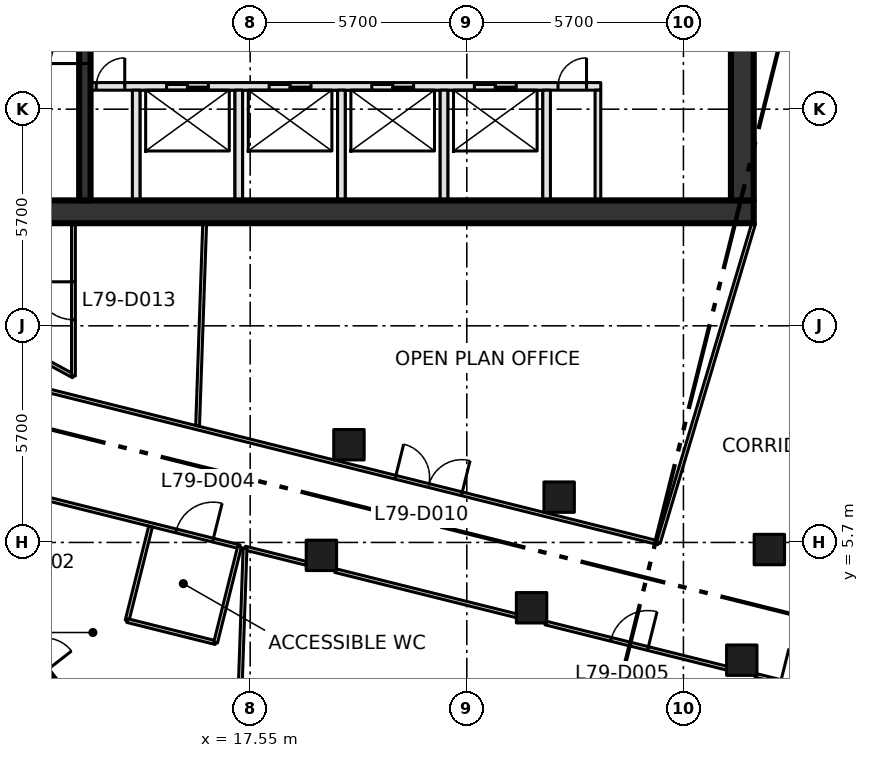
"""IFC4 building model, lengths in metres.
Left out: names, types, materials, properties, quantities, classifications, styles, units other than length and angle.
Written with IfcOpenShell. Run it as: python <this file> out.ifc"""

import sys

from ifc_helpers import new_model, si_unit, direction, frame, frame_2d, origin, origin_2d, place, context, subcontext, project, spatial, rectangle, extrude, element, fill, save


model = new_model("IFC4")
c1 = context("Model", 3, precision=1e-05, world=origin(), true_north=direction((0.0, 1.0)))
c2 = subcontext(c1, "Body", "Model", "MODEL_VIEW")
j1 = project(units=[si_unit("LENGTHUNIT", "METRE"), si_unit("PLANEANGLEUNIT", "RADIAN")], contexts=[c1])
p1 = place(None, origin())
s1 = spatial("IfcSite", under=j1, at=p1, CompositionType="ELEMENT")
p2 = place(p1, origin())
s2 = spatial("IfcBuilding", under=s1, at=p2, CompositionType="ELEMENT")
p3 = place(p2, frame((0.0, 0.0, 344.4)))
s3 = spatial("IfcBuildingStorey", under=s2, at=p3, CompositionType="ELEMENT", Elevation=344.4)
for number, where, z_axis, x_axis in (
    (1, (19.424, 5.36, 0.0), (0.0, 0.0, 1.0), (1.0, 0.0, 0.0)),
    (2, (24.954, 3.981, 0.0), (0.0, 0.0, 1.0), (1.0, 0.0, 0.0)),
    (3, (30.485, 2.602, 0.0), (0.0, 0.0, 1.0), (1.0, 0.0, 0.0)),
    (4, (20.149, 8.271, 0.0), (0.0, 0.0, 1.0), (1.0, 0.0, 0.0)),
    (5, (25.68, 6.892, 0.0), (0.0, 0.0, 1.0), (1.0, 0.0, 0.0)),
    (6, (31.211, 5.513, 0.0), (0.0, 0.0, 1.0), (1.0, 0.0, 0.0)),
):
    element("IfcColumn", number, at=place(p3, frame(where, z_axis=z_axis, x_axis=x_axis)), inside=s3, PredefinedType="COLUMN", context=c2, shape_type="SweptSolid", body=[
        extrude(rectangle(XDim=0.8, YDim=0.8, at=origin_2d()), origin(), (0.0, 0.0, 1.0), 4.2),
    ])
p4 = place(p3, frame((8.0, 14.4, -0.3), z_axis=(0.0, 0.0, 1.0), x_axis=(1.0, 0.0, 0.0)))
e7 = element("IfcWall", 7, at=p4, inside=s3, PredefinedType="SHEAR", context=c2, shape_type="SweptSolid", body=[
    extrude(rectangle(XDim=22.8, YDim=0.6, at=frame_2d((11.4, 0.0))), origin(), (0.0, 0.0, 1.0), 4.05),
])
p5 = place(p4, frame((2.3, 0.0, 0.3)))
e8 = element("IfcOpeningElement", 8, at=p5, cuts=e7, PredefinedType="OPENING", context=c2, shape_type="SweptSolid", body=[
    extrude(rectangle(XDim=1.8, YDim=2.1, at=frame_2d((0.9, 1.05))), frame((0.0, 0.31, 0.0), z_axis=(0.0, -1.0, 0.0), x_axis=(1.0, 0.0, 0.0)), (0.0, 0.0, 1.0), 0.62),
])
p6 = place(p3, frame((30.5, 14.7, -0.3), z_axis=(0.0, 0.0, 1.0), x_axis=(0.0, 1.0, 0.0)))
e9 = element("IfcWall", 9, at=p6, inside=s3, PredefinedType="SHEAR", context=c2, shape_type="SweptSolid", body=[
    extrude(rectangle(XDim=21.0, YDim=0.6, at=frame_2d((10.5, 0.0))), origin(), (0.0, 0.0, 1.0), 4.05),
])
p7 = place(p3, frame((13.35, 17.7, 0.0), z_axis=(0.0, 0.0, 1.0), x_axis=(1.0, 0.0, 0.0)))
e10 = element("IfcWall", 10, at=p7, inside=s3, PredefinedType="SOLIDWALL", context=c2, shape_type="SweptSolid", body=[
    extrude(rectangle(XDim=13.425, YDim=0.2, at=frame_2d((6.712, 0.0))), origin(), (0.0, 0.0, 1.0), 3.75),
])
p8 = place(p7, frame((2.0, 0.0, 0.0)))
e11 = element("IfcOpeningElement", 11, at=p8, cuts=e10, PredefinedType="OPENING", context=c2, shape_type="SweptSolid", body=[
    extrude(rectangle(XDim=1.1, YDim=2.1, at=frame_2d((0.55, 1.05))), frame((0.0, 0.11, 0.0), z_axis=(0.0, -1.0, 0.0), x_axis=(1.0, 0.0, 0.0)), (0.0, 0.0, 1.0), 0.22),
])
p9 = place(p7, frame((4.7, 0.0, 0.0)))
e12 = element("IfcOpeningElement", 12, at=p9, cuts=e10, PredefinedType="OPENING", context=c2, shape_type="SweptSolid", body=[
    extrude(rectangle(XDim=1.1, YDim=2.1, at=frame_2d((0.55, 1.05))), frame((0.0, 0.11, 0.0), z_axis=(0.0, -1.0, 0.0), x_axis=(1.0, 0.0, 0.0)), (0.0, 0.0, 1.0), 0.22),
])
p10 = place(p7, frame((7.4, 0.0, 0.0)))
e13 = element("IfcOpeningElement", 13, at=p10, cuts=e10, PredefinedType="OPENING", context=c2, shape_type="SweptSolid", body=[
    extrude(rectangle(XDim=1.1, YDim=2.1, at=frame_2d((0.55, 1.05))), frame((0.0, 0.11, 0.0), z_axis=(0.0, -1.0, 0.0), x_axis=(1.0, 0.0, 0.0)), (0.0, 0.0, 1.0), 0.22),
])
p11 = place(p7, frame((10.1, 0.0, 0.0)))
e14 = element("IfcOpeningElement", 14, at=p11, cuts=e10, PredefinedType="OPENING", context=c2, shape_type="SweptSolid", body=[
    extrude(rectangle(XDim=1.1, YDim=2.1, at=frame_2d((0.55, 1.05))), frame((0.0, 0.11, 0.0), z_axis=(0.0, -1.0, 0.0), x_axis=(1.0, 0.0, 0.0)), (0.0, 0.0, 1.0), 0.22),
])
p12 = place(p7, frame((0.15, 0.0, 0.0)))
e15 = element("IfcOpeningElement", 15, at=p12, cuts=e10, PredefinedType="OPENING", context=c2, shape_type="SweptSolid", body=[
    extrude(rectangle(XDim=0.75, YDim=2.1, at=frame_2d((0.375, 1.05))), frame((0.0, 0.11, 0.0), z_axis=(0.0, -1.0, 0.0), x_axis=(1.0, 0.0, 0.0)), (0.0, 0.0, 1.0), 0.22),
])
p13 = place(p7, frame((12.3, 0.0, 0.0)))
e16 = element("IfcOpeningElement", 16, at=p13, cuts=e10, PredefinedType="OPENING", context=c2, shape_type="SweptSolid", body=[
    extrude(rectangle(XDim=0.75, YDim=2.1, at=frame_2d((0.375, 1.05))), frame((0.0, 0.11, 0.0), z_axis=(0.0, -1.0, 0.0), x_axis=(1.0, 0.0, 0.0)), (0.0, 0.0, 1.0), 0.22),
])
p14 = place(p3, frame((13.2, 14.7, 0.0), z_axis=(0.0, 0.0, 1.0), x_axis=(0.0, 1.0, 0.0)))
e17 = element("IfcWall", 17, at=p14, inside=s3, PredefinedType="SHEAR", context=c2, shape_type="SweptSolid", body=[
    extrude(rectangle(XDim=21.0, YDim=0.3, at=frame_2d((10.5, 0.0))), origin(), (0.0, 0.0, 1.0), 3.75),
])
p15 = place(p14, frame((3.6, 0.0, 0.0)))
e18 = element("IfcOpeningElement", 18, at=p15, cuts=e17, PredefinedType="OPENING", context=c2, shape_type="SweptSolid", body=[
    extrude(rectangle(XDim=1.8, YDim=2.1, at=frame_2d((0.9, 1.05))), frame((0.0, 0.16, 0.0), z_axis=(0.0, -1.0, 0.0), x_axis=(1.0, 0.0, 0.0)), (0.0, 0.0, 1.0), 0.32),
])
p16 = place(p14, frame((11.7, 0.0, 0.0)))
e19 = element("IfcOpeningElement", 19, at=p16, cuts=e17, PredefinedType="OPENING", context=c2, shape_type="SweptSolid", body=[
    extrude(rectangle(XDim=1.2, YDim=2.1, at=frame_2d((0.6, 1.05))), frame((0.0, 0.16, 0.0), z_axis=(0.0, -1.0, 0.0), x_axis=(1.0, 0.0, 0.0)), (0.0, 0.0, 1.0), 0.32),
])
for number, where, z_axis, x_axis in (
    (20, (14.55, 14.7, 0.0), (0.0, 0.0, 1.0), (0.0, 1.0, 0.0)),
    (21, (17.25, 14.7, 0.0), (0.0, 0.0, 1.0), (0.0, 1.0, 0.0)),
    (22, (19.95, 14.7, 0.0), (0.0, 0.0, 1.0), (0.0, 1.0, 0.0)),
    (23, (22.65, 14.7, 0.0), (0.0, 0.0, 1.0), (0.0, 1.0, 0.0)),
    (24, (25.35, 14.7, 0.0), (0.0, 0.0, 1.0), (0.0, 1.0, 0.0)),
):
    element("IfcWall", number, at=place(p3, frame(where, z_axis=z_axis, x_axis=x_axis)), inside=s3, PredefinedType="SOLIDWALL", context=c2, shape_type="SweptSolid", body=[
        extrude(rectangle(XDim=2.9, YDim=0.2, at=frame_2d((1.45, 0.0))), origin(), (0.0, 0.0, 1.0), 3.75),
    ])
p17 = place(p3, frame((26.7, 14.7, 0.0), z_axis=(0.0, 0.0, 1.0), x_axis=(0.0, 1.0, 0.0)))
e25 = element("IfcWall", 25, at=p17, inside=s3, PredefinedType="PARTITIONING", context=c2, shape_type="SweptSolid", body=[
    extrude(rectangle(XDim=2.9, YDim=0.15, at=frame_2d((1.45, 0.0))), origin(), (0.0, 0.0, 1.0), 3.75),
])
p18 = place(p3, frame((10.224, 4.745, 0.0), z_axis=(0.0, 0.0, 1.0), x_axis=(0.615545644418, -0.788101236922, 0.0)))
e26 = element("IfcWall", 26, at=p18, inside=s3, PredefinedType="SOLIDWALL", context=c2, shape_type="SweptSolid", body=[
    extrude(rectangle(XDim=4.43, YDim=0.2, at=frame_2d((2.215, 0.0))), origin(), (0.0, 0.0, 1.0), 3.05),
])
p19 = place(p18, frame((1.315, 0.0, 0.0)))
e27 = element("IfcOpeningElement", 27, at=p19, cuts=e26, PredefinedType="OPENING", context=c2, shape_type="SweptSolid", body=[
    extrude(rectangle(XDim=1.8, YDim=2.9, at=frame_2d((0.9, 1.45))), frame((0.0, 0.11, 0.0), z_axis=(0.0, -1.0, 0.0), x_axis=(1.0, 0.0, 0.0)), (0.0, 0.0, 1.0), 0.22),
])
p20 = place(p3, frame((8.333, 7.815, 0.0), z_axis=(0.0, 0.0, 1.0), x_axis=(0.970301331289, -0.241899414012, 0.0)))
e28 = element("IfcWall", 28, at=p20, inside=s3, PredefinedType="PARTITIONING", context=c2, shape_type="SweptSolid", body=[
    extrude(rectangle(XDim=9.21, YDim=0.1, at=frame_2d((4.605, 0.0))), origin(), (0.0, 0.0, 1.0), 3.75),
])
p21 = place(p20, frame((7.49, 0.0, 0.0)))
e29 = element("IfcOpeningElement", 29, at=p21, cuts=e28, PredefinedType="OPENING", context=c2, shape_type="SweptSolid", body=[
    extrude(rectangle(XDim=1.0, YDim=2.1, at=frame_2d((0.5, 1.05))), frame((0.0, 0.06, 0.0), z_axis=(0.0, -1.0, 0.0), x_axis=(1.0, 0.0, 0.0)), (0.0, 0.0, 1.0), 0.12),
])
p22 = place(p3, frame((9.002, 10.499, 0.0), z_axis=(0.0, 0.0, 1.0), x_axis=(0.970298340477, -0.241911410372, 0.0)))
e30 = element("IfcWall", 30, at=p22, inside=s3, PredefinedType="PARTITIONING", context=c2, shape_type="SweptSolid", body=[
    extrude(rectangle(XDim=19.88, YDim=0.1, at=frame_2d((9.94, 0.0))), origin(), (0.0, 0.0, 1.0), 3.75),
])
p23 = place(p22, frame((12.749, 0.0, 0.0)))
e31 = element("IfcOpeningElement", 31, at=p23, cuts=e30, PredefinedType="OPENING", context=c2, shape_type="SweptSolid", body=[
    extrude(rectangle(XDim=1.8, YDim=2.1, at=frame_2d((0.9, 1.05))), frame((0.0, 0.06, 0.0), z_axis=(0.0, -1.0, 0.0), x_axis=(1.0, 0.0, 0.0)), (0.0, 0.0, 1.0), 0.12),
])
p24 = place(p3, frame((9.9, 11.7, 0.0), z_axis=(0.0, 0.0, 1.0), x_axis=(0.87965147249, -0.475618846291, 0.0)))
e32 = element("IfcWall", 32, at=p24, inside=s3, PredefinedType="PARTITIONING", context=c2, shape_type="SweptSolid", body=[
    extrude(rectangle(XDim=3.41, YDim=0.1, at=frame_2d((1.705, 0.0))), origin(), (0.0, 0.0, 1.0), 3.75),
])
p25 = place(p3, frame((12.9, 10.078, 0.0), z_axis=(0.0, 0.0, 1.0), x_axis=(0.0, 1.0, 0.0)))
e33 = element("IfcWall", 33, at=p25, inside=s3, PredefinedType="PARTITIONING", context=c2, shape_type="SweptSolid", body=[
    extrude(rectangle(XDim=4.022, YDim=0.1, at=frame_2d((2.011, 0.0))), origin(), (0.0, 0.0, 1.0), 3.75),
])
p26 = place(p25, frame((1.48, 0.0, 0.0)))
e34 = element("IfcOpeningElement", 34, at=p26, cuts=e33, PredefinedType="OPENING", context=c2, shape_type="SweptSolid", body=[
    extrude(rectangle(XDim=1.0, YDim=2.1, at=frame_2d((0.5, 1.05))), frame((0.0, 0.06, 0.0), z_axis=(0.0, -1.0, 0.0), x_axis=(1.0, 0.0, 0.0)), (0.0, 0.0, 1.0), 0.12),
])
p27 = place(p3, frame((17.415, 5.551, 0.0), z_axis=(0.0, 0.0, 1.0), x_axis=(0.970298198748, -0.241911978838, 0.0)))
e35 = element("IfcWall", 35, at=p27, inside=s3, PredefinedType="PARTITIONING", context=c2, shape_type="SweptSolid", body=[
    extrude(rectangle(XDim=1.658, YDim=0.1, at=frame_2d((0.829, 0.0))), origin(), (0.0, 0.0, 1.0), 3.75),
])
p28 = place(p3, frame((19.786, 4.96, 0.0), z_axis=(0.0, 0.0, 1.0), x_axis=(0.970288447449, -0.24195108751, 0.0)))
e36 = element("IfcWall", 36, at=p28, inside=s3, PredefinedType="PARTITIONING", context=c2, shape_type="SweptSolid", body=[
    extrude(rectangle(XDim=4.914, YDim=0.1, at=frame_2d((2.457, 0.0))), origin(), (0.0, 0.0, 1.0), 3.75),
])
p29 = place(p3, frame((25.318, 3.581, 0.0), z_axis=(0.0, 0.0, 1.0), x_axis=(0.970320559999, -0.241822271189, 0.0)))
e37 = element("IfcWall", 37, at=p29, inside=s3, PredefinedType="PARTITIONING", context=c2, shape_type="SweptSolid", body=[
    extrude(rectangle(XDim=4.913, YDim=0.1, at=frame_2d((2.456, 0.0))), origin(), (0.0, 0.0, 1.0), 3.75),
])
p30 = place(p29, frame((1.78, 0.0, 0.0)))
e38 = element("IfcOpeningElement", 38, at=p30, cuts=e37, PredefinedType="OPENING", context=c2, shape_type="SweptSolid", body=[
    extrude(rectangle(XDim=1.0, YDim=2.1, at=frame_2d((0.5, 1.05))), frame((0.0, 0.06, 0.0), z_axis=(0.0, -1.0, 0.0), x_axis=(1.0, 0.0, 0.0)), (0.0, 0.0, 1.0), 0.12),
])
p31 = place(p3, frame((30.8, 14.1, 0.0), z_axis=(0.0, 0.0, 1.0), x_axis=(-0.28588265334, -0.958264633867, 0.0)))
e39 = element("IfcWall", 39, at=p31, inside=s3, PredefinedType="PARTITIONING", context=c2, shape_type="SweptSolid", body=[
    extrude(rectangle(XDim=8.776, YDim=0.1, at=frame_2d((4.388, 0.0))), origin(), (0.0, 0.0, 1.0), 3.75),
])
p32 = place(p3, frame((30.85, 2.202, 0.0), z_axis=(0.0, 0.0, 1.0), x_axis=(0.970308932068, -0.2418689239, 0.0)))
e40 = element("IfcWall", 40, at=p32, inside=s3, PredefinedType="PARTITIONING", context=c2, shape_type="SweptSolid", body=[
    extrude(rectangle(XDim=4.912, YDim=0.1, at=frame_2d((2.456, 0.0))), origin(), (0.0, 0.0, 1.0), 3.75),
])
p33 = place(p32, frame((0.68, 0.0, 0.0)))
e41 = element("IfcOpeningElement", 41, at=p33, cuts=e40, PredefinedType="OPENING", context=c2, shape_type="SweptSolid", body=[
    extrude(rectangle(XDim=1.8, YDim=2.1, at=frame_2d((0.9, 1.05))), frame((0.0, 0.06, 0.0), z_axis=(0.0, -1.0, 0.0), x_axis=(1.0, 0.0, 0.0)), (0.0, 0.0, 1.0), 0.12),
])
p34 = place(p3, frame((14.312, 3.645, 0.0), z_axis=(0.0, 0.0, 1.0), x_axis=(0.241972320765, 0.970283152478, 0.0)))
e42 = element("IfcWall", 42, at=p34, inside=s3, PredefinedType="PARTITIONING", context=c2, shape_type="SweptSolid", body=[
    extrude(rectangle(XDim=2.55, YDim=0.1, at=frame_2d((1.275, 0.0))), origin(), (0.0, 0.0, 1.0), 3.75),
])
p35 = place(p3, frame((16.167, 8.775, 0.0), z_axis=(0.0, 0.0, 1.0), x_axis=(0.034913599617, 0.999390334435, 0.0)))
e43 = element("IfcWall", 43, at=p35, inside=s3, PredefinedType="PARTITIONING", context=c2, shape_type="SweptSolid", body=[
    extrude(rectangle(XDim=5.328, YDim=0.1, at=frame_2d((2.664, 0.0))), origin(), (0.0, 0.0, 1.0), 3.75),
])
p36 = place(p3, frame((16.641, 3.064, 0.0), z_axis=(0.0, 0.0, 1.0), x_axis=(-0.970262034576, 0.242056985565, 0.0)))
e44 = element("IfcWall", 44, at=p36, inside=s3, PredefinedType="PARTITIONING", context=c2, shape_type="SweptSolid", body=[
    extrude(rectangle(XDim=2.4, YDim=0.1, at=frame_2d((1.2, 0.0))), origin(), (0.0, 0.0, 1.0), 3.75),
])
p37 = place(p3, frame((17.109, -3.238, 0.0), z_axis=(0.0, 0.0, 1.0), x_axis=(0.034812219839, 0.999393870979, 0.0)))
e45 = element("IfcWall", 45, at=p37, inside=s3, PredefinedType="PARTITIONING", context=c2, shape_type="SweptSolid", body=[
    extrude(rectangle(XDim=8.794, YDim=0.1, at=frame_2d((4.397, 0.0))), origin(), (0.0, 0.0, 1.0), 3.75),
])
p38 = place(p3, frame((17.27, 5.587, 0.0), z_axis=(0.0, 0.0, 1.0), x_axis=(-0.241872782222, -0.970307970296, 0.0)))
e46 = element("IfcWall", 46, at=p38, inside=s3, PredefinedType="PARTITIONING", context=c2, shape_type="SweptSolid", body=[
    extrude(rectangle(XDim=2.6, YDim=0.1, at=frame_2d((1.3, 0.0))), origin(), (0.0, 0.0, 1.0), 3.75),
])
p39 = place(p8, origin())
e47 = element("IfcDoor", 47, at=p39, inside=s3, OperationType="SLIDING_TO_LEFT", PredefinedType="DOOR", context=c2, shape_type="SweptSolid", body=[
    extrude(rectangle(XDim=1.1, YDim=2.1, at=frame_2d((0.55, 1.05))), frame((0.0, 0.025, 0.0), z_axis=(0.0, -1.0, 0.0), x_axis=(1.0, 0.0, 0.0)), (0.0, 0.0, 1.0), 0.05),
])
fill(e11, e47)
p40 = place(p9, origin())
e48 = element("IfcDoor", 48, at=p40, inside=s3, OperationType="SLIDING_TO_LEFT", PredefinedType="DOOR", context=c2, shape_type="SweptSolid", body=[
    extrude(rectangle(XDim=1.1, YDim=2.1, at=frame_2d((0.55, 1.05))), frame((0.0, 0.025, 0.0), z_axis=(0.0, -1.0, 0.0), x_axis=(1.0, 0.0, 0.0)), (0.0, 0.0, 1.0), 0.05),
])
fill(e12, e48)
p41 = place(p10, origin())
e49 = element("IfcDoor", 49, at=p41, inside=s3, OperationType="SLIDING_TO_LEFT", PredefinedType="DOOR", context=c2, shape_type="SweptSolid", body=[
    extrude(rectangle(XDim=1.1, YDim=2.1, at=frame_2d((0.55, 1.05))), frame((0.0, 0.025, 0.0), z_axis=(0.0, -1.0, 0.0), x_axis=(1.0, 0.0, 0.0)), (0.0, 0.0, 1.0), 0.05),
])
fill(e13, e49)
p42 = place(p11, origin())
e50 = element("IfcDoor", 50, at=p42, inside=s3, OperationType="SLIDING_TO_LEFT", PredefinedType="DOOR", context=c2, shape_type="SweptSolid", body=[
    extrude(rectangle(XDim=1.1, YDim=2.1, at=frame_2d((0.55, 1.05))), frame((0.0, 0.025, 0.0), z_axis=(0.0, -1.0, 0.0), x_axis=(1.0, 0.0, 0.0)), (0.0, 0.0, 1.0), 0.05),
])
fill(e14, e50)
p43 = place(p12, origin())
e51 = element("IfcDoor", 51, at=p43, inside=s3, OperationType="SINGLE_SWING_RIGHT", PredefinedType="DOOR", context=c2, shape_type="SweptSolid", body=[
    extrude(rectangle(XDim=0.75, YDim=2.1, at=frame_2d((0.375, 1.05))), frame((0.0, 0.025, 0.0), z_axis=(0.0, -1.0, 0.0), x_axis=(1.0, 0.0, 0.0)), (0.0, 0.0, 1.0), 0.05),
])
fill(e15, e51)
p44 = place(p13, origin())
e52 = element("IfcDoor", 52, at=p44, inside=s3, OperationType="SINGLE_SWING_RIGHT", PredefinedType="DOOR", context=c2, shape_type="SweptSolid", body=[
    extrude(rectangle(XDim=0.75, YDim=2.1, at=frame_2d((0.375, 1.05))), frame((0.0, 0.025, 0.0), z_axis=(0.0, -1.0, 0.0), x_axis=(1.0, 0.0, 0.0)), (0.0, 0.0, 1.0), 0.05),
])
fill(e16, e52)
p45 = place(p15, origin())
e53 = element("IfcDoor", 53, at=p45, inside=s3, OperationType="DOUBLE_DOOR_SINGLE_SWING", PredefinedType="DOOR", context=c2, shape_type="SweptSolid", body=[
    extrude(rectangle(XDim=1.8, YDim=2.1, at=frame_2d((0.9, 1.05))), frame((0.0, 0.025, 0.0), z_axis=(0.0, -1.0, 0.0), x_axis=(1.0, 0.0, 0.0)), (0.0, 0.0, 1.0), 0.05),
])
fill(e18, e53)
p46 = place(p21, origin())
e54 = element("IfcDoor", 54, at=p46, inside=s3, OperationType="SINGLE_SWING_RIGHT", PredefinedType="DOOR", context=c2, shape_type="SweptSolid", body=[
    extrude(rectangle(XDim=1.0, YDim=2.1, at=frame_2d((0.5, 1.05))), frame((0.0, 0.025, 0.0), z_axis=(0.0, -1.0, 0.0), x_axis=(1.0, 0.0, 0.0)), (0.0, 0.0, 1.0), 0.05),
])
fill(e29, e54)
p47 = place(p30, origin())
e55 = element("IfcDoor", 55, at=p47, inside=s3, OperationType="SINGLE_SWING_RIGHT", PredefinedType="DOOR", context=c2, shape_type="SweptSolid", body=[
    extrude(rectangle(XDim=1.0, YDim=2.1, at=frame_2d((0.5, 1.05))), frame((0.0, 0.025, 0.0), z_axis=(0.0, -1.0, 0.0), x_axis=(1.0, 0.0, 0.0)), (0.0, 0.0, 1.0), 0.05),
])
fill(e38, e55)
p48 = place(p23, origin())
e56 = element("IfcDoor", 56, at=p48, inside=s3, OperationType="DOUBLE_DOOR_SINGLE_SWING", PredefinedType="DOOR", context=c2, shape_type="SweptSolid", body=[
    extrude(rectangle(XDim=1.8, YDim=2.1, at=frame_2d((0.9, 1.05))), frame((0.0, 0.025, 0.0), z_axis=(0.0, -1.0, 0.0), x_axis=(1.0, 0.0, 0.0)), (0.0, 0.0, 1.0), 0.05),
])
fill(e31, e56)
p49 = place(p26, origin())
e57 = element("IfcDoor", 57, at=p49, inside=s3, OperationType="SINGLE_SWING_RIGHT", PredefinedType="DOOR", context=c2, shape_type="SweptSolid", body=[
    extrude(rectangle(XDim=1.0, YDim=2.1, at=frame_2d((0.5, 1.05))), frame((0.0, 0.025, 0.0), z_axis=(0.0, -1.0, 0.0), x_axis=(1.0, 0.0, 0.0)), (0.0, 0.0, 1.0), 0.05),
])
fill(e34, e57)
save(model, sys.argv[1])
